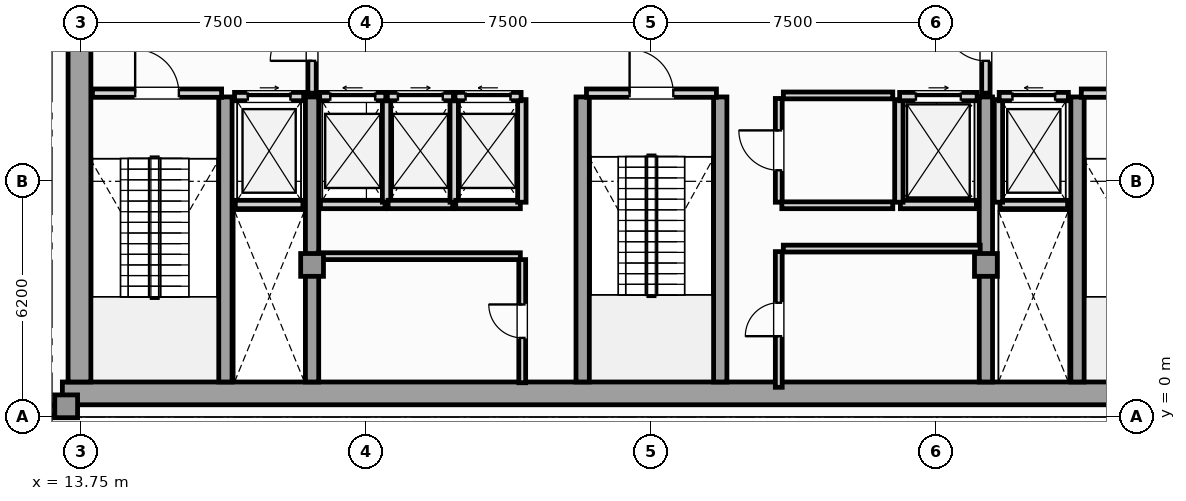
"""IFC4 building model, lengths in metres.
Left out: names, types, materials, properties, quantities, classifications, styles, units other than length and angle.
Written with IfcOpenShell. Run it as: python <this file> out.ifc"""

import sys

from ifc_helpers import new_model, si_unit, direction, frame, frame_2d, origin, origin_2d, place, context, subcontext, project, spatial, rectangle, extrude, element, fill, save


model = new_model("IFC4")
c1 = context("Model", 3, precision=1e-05, world=origin(), true_north=direction((0.0, 1.0)))
c2 = subcontext(c1, "Body", "Model", "MODEL_VIEW")
j1 = project(units=[si_unit("LENGTHUNIT", "METRE"), si_unit("PLANEANGLEUNIT", "RADIAN")], contexts=[c1])
p1 = place(None, origin())
s1 = spatial("IfcSite", under=j1, at=p1, CompositionType="ELEMENT")
p2 = place(p1, origin())
s2 = spatial("IfcBuilding", under=s1, at=p2, CompositionType="ELEMENT")
p3 = place(p2, frame((0.0, 0.0, 276.0)))
s3 = spatial("IfcBuildingStorey", under=s2, at=p3, CompositionType="ELEMENT", Elevation=276.0)
p4 = place(p3, frame((13.25, 0.62, 0.0), z_axis=(0.0, 0.0, 1.0), x_axis=(1.0, 0.0, 0.0)))
e1 = element("IfcWall", 1, at=p4, inside=s3, PredefinedType="SHEAR", context=c2, shape_type="SweptSolid", body=[
    extrude(rectangle(XDim=31.0, YDim=0.6, at=frame_2d((15.5, 0.0))), origin(), (0.0, 0.0, 1.0), 4.85),
])
p5 = place(p3, frame((13.7, 0.92, 0.0), z_axis=(0.0, 0.0, 1.0), x_axis=(0.0, 1.0, 0.0)))
e2 = element("IfcWall", 2, at=p5, inside=s3, PredefinedType="SHEAR", context=c2, shape_type="SweptSolid", body=[
    extrude(rectangle(XDim=10.53, YDim=0.6, at=frame_2d((5.265, 0.0))), origin(), (0.0, 0.0, 1.0), 4.85),
])
for number, where, z_axis, x_axis in (
    (3, (17.54, 0.92, 0.0), (0.0, 0.0, 1.0), (0.0, 1.0, 0.0)),
    (4, (19.82, 0.92, 0.0), (0.0, 0.0, 1.0), (0.0, 1.0, 0.0)),
    (5, (26.94, 0.92, 0.0), (0.0, 0.0, 1.0), (0.0, 1.0, 0.0)),
    (6, (30.56, 0.92, 0.0), (0.0, 0.0, 1.0), (0.0, 1.0, 0.0)),
    (7, (37.55, 0.92, 0.0), (0.0, 0.0, 1.0), (0.0, 1.0, 0.0)),
    (8, (39.96, 0.92, 0.0), (0.0, 0.0, 1.0), (0.0, 1.0, 0.0)),
):
    element("IfcWall", number, at=place(p3, frame(where, z_axis=z_axis, x_axis=x_axis)), inside=s3, PredefinedType="SHEAR", context=c2, shape_type="SweptSolid", body=[
        extrude(rectangle(XDim=7.5, YDim=0.35, at=frame_2d((3.75, 0.0))), origin(), (0.0, 0.0, 1.0), 4.85),
    ])
for number, where, z_axis, x_axis in (
    (9, (13.35, 0.28, 0.0), (0.0, 0.0, 1.0), (1.0, 0.0, 0.0)),
    (10, (19.82, 4.0, 0.0), (0.0, 0.0, 1.0), (1.0, 0.0, 0.0)),
    (11, (37.55, 4.0, 0.0), (0.0, 0.0, 1.0), (1.0, 0.0, 0.0)),
):
    element("IfcColumn", number, at=place(p3, frame(where, z_axis=z_axis, x_axis=x_axis)), inside=s3, PredefinedType="COLUMN", context=c2, shape_type="SweptSolid", body=[
        extrude(rectangle(XDim=0.6, YDim=0.6, at=origin_2d()), origin(), (0.0, 0.0, 1.0), 5.05),
    ])
p6 = place(p3, frame((11.522, 0.18, 0.0), z_axis=(0.0, 0.0, 1.0), x_axis=(1.0, 0.0, 0.0)))
e12 = element("IfcWall", 12, at=p6, inside=s3, PredefinedType="SOLIDWALL", context=c2, shape_type="SweptSolid", body=[
    extrude(rectangle(XDim=1.728, YDim=0.26, at=frame_2d((0.864, 0.0))), origin(), (0.0, 0.0, 1.0), 4.85),
])
p7 = place(p3, frame((17.8, 5.59, 0.0), z_axis=(0.0, 0.0, 1.0), x_axis=(1.0, 0.0, 0.0)))
e13 = element("IfcWall", 13, at=p7, inside=s3, PredefinedType="SOLIDWALL", context=c2, shape_type="SweptSolid", body=[
    extrude(rectangle(XDim=1.78, YDim=0.22, at=frame_2d((0.89, 0.0))), origin(), (0.0, 0.0, 1.0), 4.85),
])
p8 = place(p3, frame((17.78, 8.43, 0.0), z_axis=(0.0, 0.0, 1.0), x_axis=(1.0, 0.0, 0.0)))
e14 = element("IfcWall", 14, at=p8, inside=s3, PredefinedType="SOLIDWALL", context=c2, shape_type="SweptSolid", body=[
    extrude(rectangle(XDim=1.82, YDim=0.22, at=frame_2d((0.91, 0.0))), origin(), (0.0, 0.0, 1.0), 4.85),
])
p9 = place(p8, frame((0.35, 0.0, 0.0)))
e15 = element("IfcOpeningElement", 15, at=p9, cuts=e14, PredefinedType="OPENING", context=c2, shape_type="SweptSolid", body=[
    extrude(rectangle(XDim=1.12, YDim=2.25, at=frame_2d((0.56, 1.125))), frame((0.0, 0.12, 0.0), z_axis=(0.0, -1.0, 0.0), x_axis=(1.0, 0.0, 0.0)), (0.0, 0.0, 1.0), 0.24),
])
p10 = place(p3, frame((37.92, 5.59, 0.0), z_axis=(0.0, 0.0, 1.0), x_axis=(1.0, 0.0, 0.0)))
e16 = element("IfcWall", 16, at=p10, inside=s3, PredefinedType="SOLIDWALL", context=c2, shape_type="SweptSolid", body=[
    extrude(rectangle(XDim=1.78, YDim=0.22, at=frame_2d((0.89, 0.0))), origin(), (0.0, 0.0, 1.0), 4.85),
])
p11 = place(p3, frame((37.88, 5.65, 0.0), z_axis=(0.0, 0.0, 1.0), x_axis=(0.0, 1.0, 0.0)))
e17 = element("IfcWall", 17, at=p11, inside=s3, PredefinedType="SOLIDWALL", context=c2, shape_type="SweptSolid", body=[
    extrude(rectangle(XDim=2.7, YDim=0.22, at=frame_2d((1.35, 0.0))), origin(), (0.0, 0.0, 1.0), 4.85),
])
p12 = place(p3, frame((37.9, 8.43, 0.0), z_axis=(0.0, 0.0, 1.0), x_axis=(1.0, 0.0, 0.0)))
e18 = element("IfcWall", 18, at=p12, inside=s3, PredefinedType="SOLIDWALL", context=c2, shape_type="SweptSolid", body=[
    extrude(rectangle(XDim=1.82, YDim=0.22, at=frame_2d((0.91, 0.0))), origin(), (0.0, 0.0, 1.0), 4.85),
])
p13 = place(p12, frame((0.35, 0.0, 0.0)))
e19 = element("IfcOpeningElement", 19, at=p13, cuts=e18, PredefinedType="OPENING", context=c2, shape_type="SweptSolid", body=[
    extrude(rectangle(XDim=1.12, YDim=2.25, at=frame_2d((0.56, 1.125))), frame((0.0, 0.12, 0.0), z_axis=(0.0, -1.0, 0.0), x_axis=(1.0, 0.0, 0.0)), (0.0, 0.0, 1.0), 0.24),
])
p14 = place(p3, frame((35.3, 5.59, 0.0), z_axis=(0.0, 0.0, 1.0), x_axis=(1.0, 0.0, 0.0)))
e20 = element("IfcWall", 20, at=p14, inside=s3, PredefinedType="SOLIDWALL", context=c2, shape_type="SweptSolid", body=[
    extrude(rectangle(XDim=2.0, YDim=0.22, at=frame_2d((1.0, 0.0))), origin(), (0.0, 0.0, 1.0), 4.85),
])
p15 = place(p3, frame((35.26, 5.65, 0.0), z_axis=(0.0, 0.0, 1.0), x_axis=(0.0, 1.0, 0.0)))
e21 = element("IfcWall", 21, at=p15, inside=s3, PredefinedType="SOLIDWALL", context=c2, shape_type="SweptSolid", body=[
    extrude(rectangle(XDim=2.7, YDim=0.22, at=frame_2d((1.35, 0.0))), origin(), (0.0, 0.0, 1.0), 4.85),
])
p16 = place(p3, frame((35.28, 8.43, 0.0), z_axis=(0.0, 0.0, 1.0), x_axis=(1.0, 0.0, 0.0)))
e22 = element("IfcWall", 22, at=p16, inside=s3, PredefinedType="SOLIDWALL", context=c2, shape_type="SweptSolid", body=[
    extrude(rectangle(XDim=2.04, YDim=0.22, at=frame_2d((1.02, 0.0))), origin(), (0.0, 0.0, 1.0), 4.85),
])
p17 = place(p16, frame((0.43, 0.0, 0.0)))
e23 = element("IfcOpeningElement", 23, at=p17, cuts=e22, PredefinedType="OPENING", context=c2, shape_type="SweptSolid", body=[
    extrude(rectangle(XDim=1.18, YDim=2.2, at=frame_2d((0.59, 1.1))), frame((0.0, 0.12, 0.0), z_axis=(0.0, -1.0, 0.0), x_axis=(1.0, 0.0, 0.0)), (0.0, 0.0, 1.0), 0.24),
])
p18 = place(p3, frame((20.04, 5.59, 0.0), z_axis=(0.0, 0.0, 1.0), x_axis=(1.0, 0.0, 0.0)))
e24 = element("IfcWall", 24, at=p18, inside=s3, PredefinedType="SOLIDWALL", context=c2, shape_type="SweptSolid", body=[
    extrude(rectangle(XDim=1.7, YDim=0.22, at=frame_2d((0.85, 0.0))), origin(), (0.0, 0.0, 1.0), 4.85),
])
p19 = place(p3, frame((21.78, 5.65, 0.0), z_axis=(0.0, 0.0, 1.0), x_axis=(0.0, 1.0, 0.0)))
e25 = element("IfcWall", 25, at=p19, inside=s3, PredefinedType="SOLIDWALL", context=c2, shape_type="SweptSolid", body=[
    extrude(rectangle(XDim=2.7, YDim=0.22, at=frame_2d((1.35, 0.0))), origin(), (0.0, 0.0, 1.0), 4.85),
])
p20 = place(p3, frame((20.02, 8.43, 0.0), z_axis=(0.0, 0.0, 1.0), x_axis=(1.0, 0.0, 0.0)))
e26 = element("IfcWall", 26, at=p20, inside=s3, PredefinedType="SOLIDWALL", context=c2, shape_type="SweptSolid", body=[
    extrude(rectangle(XDim=1.74, YDim=0.22, at=frame_2d((0.87, 0.0))), origin(), (0.0, 0.0, 1.0), 4.85),
])
p21 = place(p20, frame((0.28, 0.0, 0.0)))
e27 = element("IfcOpeningElement", 27, at=p21, cuts=e26, PredefinedType="OPENING", context=c2, shape_type="SweptSolid", body=[
    extrude(rectangle(XDim=1.18, YDim=2.2, at=frame_2d((0.59, 1.1))), frame((0.0, 0.12, 0.0), z_axis=(0.0, -1.0, 0.0), x_axis=(1.0, 0.0, 0.0)), (0.0, 0.0, 1.0), 0.24),
])
p22 = place(p3, frame((21.82, 5.59, 0.0), z_axis=(0.0, 0.0, 1.0), x_axis=(1.0, 0.0, 0.0)))
e28 = element("IfcWall", 28, at=p22, inside=s3, PredefinedType="SOLIDWALL", context=c2, shape_type="SweptSolid", body=[
    extrude(rectangle(XDim=1.7, YDim=0.22, at=frame_2d((0.85, 0.0))), origin(), (0.0, 0.0, 1.0), 4.85),
])
p23 = place(p3, frame((23.56, 5.65, 0.0), z_axis=(0.0, 0.0, 1.0), x_axis=(0.0, 1.0, 0.0)))
e29 = element("IfcWall", 29, at=p23, inside=s3, PredefinedType="SOLIDWALL", context=c2, shape_type="SweptSolid", body=[
    extrude(rectangle(XDim=2.7, YDim=0.22, at=frame_2d((1.35, 0.0))), origin(), (0.0, 0.0, 1.0), 4.85),
])
p24 = place(p3, frame((21.8, 8.43, 0.0), z_axis=(0.0, 0.0, 1.0), x_axis=(1.0, 0.0, 0.0)))
e30 = element("IfcWall", 30, at=p24, inside=s3, PredefinedType="SOLIDWALL", context=c2, shape_type="SweptSolid", body=[
    extrude(rectangle(XDim=1.74, YDim=0.22, at=frame_2d((0.87, 0.0))), origin(), (0.0, 0.0, 1.0), 4.85),
])
p25 = place(p24, frame((0.28, 0.0, 0.0)))
e31 = element("IfcOpeningElement", 31, at=p25, cuts=e30, PredefinedType="OPENING", context=c2, shape_type="SweptSolid", body=[
    extrude(rectangle(XDim=1.18, YDim=2.2, at=frame_2d((0.59, 1.1))), frame((0.0, 0.12, 0.0), z_axis=(0.0, -1.0, 0.0), x_axis=(1.0, 0.0, 0.0)), (0.0, 0.0, 1.0), 0.24),
])
p26 = place(p3, frame((23.6, 5.59, 0.0), z_axis=(0.0, 0.0, 1.0), x_axis=(1.0, 0.0, 0.0)))
e32 = element("IfcWall", 32, at=p26, inside=s3, PredefinedType="SOLIDWALL", context=c2, shape_type="SweptSolid", body=[
    extrude(rectangle(XDim=1.7, YDim=0.22, at=frame_2d((0.85, 0.0))), origin(), (0.0, 0.0, 1.0), 4.85),
])
p27 = place(p3, frame((25.34, 5.65, 0.0), z_axis=(0.0, 0.0, 1.0), x_axis=(0.0, 1.0, 0.0)))
e33 = element("IfcWall", 33, at=p27, inside=s3, PredefinedType="SOLIDWALL", context=c2, shape_type="SweptSolid", body=[
    extrude(rectangle(XDim=2.7, YDim=0.22, at=frame_2d((1.35, 0.0))), origin(), (0.0, 0.0, 1.0), 4.85),
])
p28 = place(p3, frame((23.58, 8.43, 0.0), z_axis=(0.0, 0.0, 1.0), x_axis=(1.0, 0.0, 0.0)))
e34 = element("IfcWall", 34, at=p28, inside=s3, PredefinedType="SOLIDWALL", context=c2, shape_type="SweptSolid", body=[
    extrude(rectangle(XDim=1.74, YDim=0.22, at=frame_2d((0.87, 0.0))), origin(), (0.0, 0.0, 1.0), 4.85),
])
p29 = place(p28, frame((0.28, 0.0, 0.0)))
e35 = element("IfcOpeningElement", 35, at=p29, cuts=e34, PredefinedType="OPENING", context=c2, shape_type="SweptSolid", body=[
    extrude(rectangle(XDim=1.18, YDim=2.2, at=frame_2d((0.59, 1.1))), frame((0.0, 0.12, 0.0), z_axis=(0.0, -1.0, 0.0), x_axis=(1.0, 0.0, 0.0)), (0.0, 0.0, 1.0), 0.24),
])
p30 = place(p3, frame((14.04, 8.52, 0.0), z_axis=(0.0, 0.0, 1.0), x_axis=(1.0, 0.0, 0.0)))
e36 = element("IfcWall", 36, at=p30, inside=s3, PredefinedType="SOLIDWALL", context=c2, shape_type="SweptSolid", body=[
    extrude(rectangle(XDim=3.4, YDim=0.22, at=frame_2d((1.7, 0.0))), origin(), (0.0, 0.0, 1.0), 4.85),
])
p31 = place(p30, frame((1.125, 0.0, 0.0)))
e37 = element("IfcOpeningElement", 37, at=p31, cuts=e36, PredefinedType="OPENING", context=c2, shape_type="SweptSolid", body=[
    extrude(rectangle(XDim=1.15, YDim=2.2, at=frame_2d((0.575, 1.1))), frame((0.0, 0.12, 0.0), z_axis=(0.0, -1.0, 0.0), x_axis=(1.0, 0.0, 0.0)), (0.0, 0.0, 1.0), 0.24),
])
p32 = place(p3, frame((40.06, 8.52, 0.0), z_axis=(0.0, 0.0, 1.0), x_axis=(1.0, 0.0, 0.0)))
e38 = element("IfcWall", 38, at=p32, inside=s3, PredefinedType="SOLIDWALL", context=c2, shape_type="SweptSolid", body=[
    extrude(rectangle(XDim=3.4, YDim=0.22, at=frame_2d((1.7, 0.0))), origin(), (0.0, 0.0, 1.0), 4.85),
])
p33 = place(p32, frame((1.125, 0.0, 0.0)))
e39 = element("IfcOpeningElement", 39, at=p33, cuts=e38, PredefinedType="OPENING", context=c2, shape_type="SweptSolid", body=[
    extrude(rectangle(XDim=1.15, YDim=2.2, at=frame_2d((0.575, 1.1))), frame((0.0, 0.12, 0.0), z_axis=(0.0, -1.0, 0.0), x_axis=(1.0, 0.0, 0.0)), (0.0, 0.0, 1.0), 0.24),
])
p34 = place(p3, frame((27.04, 8.52, 0.0), z_axis=(0.0, 0.0, 1.0), x_axis=(1.0, 0.0, 0.0)))
e40 = element("IfcWall", 40, at=p34, inside=s3, PredefinedType="SOLIDWALL", context=c2, shape_type="SweptSolid", body=[
    extrude(rectangle(XDim=3.42, YDim=0.22, at=frame_2d((1.71, 0.0))), origin(), (0.0, 0.0, 1.0), 4.85),
])
p35 = place(p34, frame((1.135, 0.0, 0.0)))
e41 = element("IfcOpeningElement", 41, at=p35, cuts=e40, PredefinedType="OPENING", context=c2, shape_type="SweptSolid", body=[
    extrude(rectangle(XDim=1.15, YDim=2.2, at=frame_2d((0.575, 1.1))), frame((0.0, 0.12, 0.0), z_axis=(0.0, -1.0, 0.0), x_axis=(1.0, 0.0, 0.0)), (0.0, 0.0, 1.0), 0.24),
])
p36 = place(p3, frame((19.82, 8.52, 0.0), z_axis=(0.0, 0.0, 1.0), x_axis=(0.0, 1.0, 0.0)))
e42 = element("IfcWall", 42, at=p36, inside=s3, PredefinedType="SOLIDWALL", context=c2, shape_type="SweptSolid", body=[
    extrude(rectangle(XDim=2.8, YDim=0.22, at=frame_2d((1.4, 0.0))), origin(), (0.0, 0.0, 1.0), 4.305),
])
p37 = place(p36, frame((0.85, 0.0, 0.0)))
e43 = element("IfcOpeningElement", 43, at=p37, cuts=e42, PredefinedType="OPENING", context=c2, shape_type="SweptSolid", body=[
    extrude(rectangle(XDim=1.1, YDim=2.2, at=frame_2d((0.55, 1.1))), frame((0.0, 0.12, 0.0), z_axis=(0.0, -1.0, 0.0), x_axis=(1.0, 0.0, 0.0)), (0.0, 0.0, 1.0), 0.24),
])
p38 = place(p3, frame((37.55, 8.52, 0.0), z_axis=(0.0, 0.0, 1.0), x_axis=(0.0, 1.0, 0.0)))
e44 = element("IfcWall", 44, at=p38, inside=s3, PredefinedType="SOLIDWALL", context=c2, shape_type="SweptSolid", body=[
    extrude(rectangle(XDim=2.8, YDim=0.22, at=frame_2d((1.4, 0.0))), origin(), (0.0, 0.0, 1.0), 4.305),
])
p39 = place(p38, frame((0.85, 0.0, 0.0)))
e45 = element("IfcOpeningElement", 45, at=p39, cuts=e44, PredefinedType="OPENING", context=c2, shape_type="SweptSolid", body=[
    extrude(rectangle(XDim=1.1, YDim=2.2, at=frame_2d((0.55, 1.1))), frame((0.0, 0.12, 0.0), z_axis=(0.0, -1.0, 0.0), x_axis=(1.0, 0.0, 0.0)), (0.0, 0.0, 1.0), 0.24),
])
p40 = place(p3, frame((25.35, 0.9, 0.0), z_axis=(0.0, 0.0, 1.0), x_axis=(0.0, 1.0, 0.0)))
e46 = element("IfcWall", 46, at=p40, inside=s3, PredefinedType="PARTITIONING", context=c2, shape_type="SweptSolid", body=[
    extrude(rectangle(XDim=3.24, YDim=0.18, at=frame_2d((1.62, 0.0))), origin(), (0.0, 0.0, 1.0), 4.85),
])
p41 = place(p40, frame((1.18, 0.0, 0.0)))
e47 = element("IfcOpeningElement", 47, at=p41, cuts=e46, PredefinedType="OPENING", context=c2, shape_type="SweptSolid", body=[
    extrude(rectangle(XDim=0.88, YDim=2.05, at=frame_2d((0.44, 1.025))), frame((0.0, 0.1, 0.0), z_axis=(0.0, -1.0, 0.0), x_axis=(1.0, 0.0, 0.0)), (0.0, 0.0, 1.0), 0.2),
])
p42 = place(p3, frame((19.98, 4.23, 0.0), z_axis=(0.0, 0.0, 1.0), x_axis=(1.0, 0.0, 0.0)))
e48 = element("IfcWall", 48, at=p42, inside=s3, PredefinedType="PARTITIONING", context=c2, shape_type="SweptSolid", body=[
    extrude(rectangle(XDim=5.32, YDim=0.18, at=frame_2d((2.66, 0.0))), origin(), (0.0, 0.0, 1.0), 4.85),
])
p43 = place(p3, frame((32.1, 0.78, 0.0), z_axis=(0.0, 0.0, 1.0), x_axis=(0.0, 1.0, 0.0)))
e49 = element("IfcWall", 49, at=p43, inside=s3, PredefinedType="PARTITIONING", context=c2, shape_type="SweptSolid", body=[
    extrude(rectangle(XDim=3.57, YDim=0.18, at=frame_2d((1.785, 0.0))), origin(), (0.0, 0.0, 1.0), 4.85),
])
p44 = place(p43, frame((1.345, 0.0, 0.0)))
e50 = element("IfcOpeningElement", 50, at=p44, cuts=e49, PredefinedType="OPENING", context=c2, shape_type="SweptSolid", body=[
    extrude(rectangle(XDim=0.88, YDim=2.05, at=frame_2d((0.44, 1.025))), frame((0.0, 0.1, 0.0), z_axis=(0.0, -1.0, 0.0), x_axis=(1.0, 0.0, 0.0)), (0.0, 0.0, 1.0), 0.2),
])
p45 = place(p3, frame((32.22, 4.43, 0.0), z_axis=(0.0, 0.0, 1.0), x_axis=(1.0, 0.0, 0.0)))
e51 = element("IfcWall", 51, at=p45, inside=s3, PredefinedType="PARTITIONING", context=c2, shape_type="SweptSolid", body=[
    extrude(rectangle(XDim=5.18, YDim=0.18, at=frame_2d((2.59, 0.0))), origin(), (0.0, 0.0, 1.0), 4.85),
])
p46 = place(p3, frame((32.1, 5.65, 0.0), z_axis=(0.0, 0.0, 1.0), x_axis=(0.0, 1.0, 0.0)))
e52 = element("IfcWall", 52, at=p46, inside=s3, PredefinedType="PARTITIONING", context=c2, shape_type="SweptSolid", body=[
    extrude(rectangle(XDim=2.73, YDim=0.18, at=frame_2d((1.365, 0.0))), origin(), (0.0, 0.0, 1.0), 4.85),
])
p47 = place(p46, frame((0.84, 0.0, 0.0)))
e53 = element("IfcOpeningElement", 53, at=p47, cuts=e52, PredefinedType="OPENING", context=c2, shape_type="SweptSolid", body=[
    extrude(rectangle(XDim=1.05, YDim=2.15, at=frame_2d((0.525, 1.075))), frame((0.0, 0.1, 0.0), z_axis=(0.0, -1.0, 0.0), x_axis=(1.0, 0.0, 0.0)), (0.0, 0.0, 1.0), 0.2),
])
p48 = place(p3, frame((32.22, 8.46, 0.0), z_axis=(0.0, 0.0, 1.0), x_axis=(1.0, 0.0, 0.0)))
e54 = element("IfcWall", 54, at=p48, inside=s3, PredefinedType="PARTITIONING", context=c2, shape_type="SweptSolid", body=[
    extrude(rectangle(XDim=2.88, YDim=0.18, at=frame_2d((1.44, 0.0))), origin(), (0.0, 0.0, 1.0), 4.85),
])
p49 = place(p3, frame((32.18, 5.57, 0.0), z_axis=(0.0, 0.0, 1.0), x_axis=(1.0, 0.0, 0.0)))
e55 = element("IfcWall", 55, at=p49, inside=s3, PredefinedType="PARTITIONING", context=c2, shape_type="SweptSolid", body=[
    extrude(rectangle(XDim=2.92, YDim=0.18, at=frame_2d((1.46, 0.0))), origin(), (0.0, 0.0, 1.0), 4.85),
])
p50 = place(p9, origin())
e56 = element("IfcDoor", 56, at=p50, inside=s3, OperationType="SLIDING_TO_RIGHT", PredefinedType="DOOR", context=c2, shape_type="SweptSolid", body=[
    extrude(rectangle(XDim=1.12, YDim=2.25, at=frame_2d((0.56, 1.125))), frame((0.0, 0.025, 0.0), z_axis=(0.0, -1.0, 0.0), x_axis=(1.0, 0.0, 0.0)), (0.0, 0.0, 1.0), 0.05),
])
fill(e15, e56)
p51 = place(p13, origin())
e57 = element("IfcDoor", 57, at=p51, inside=s3, OperationType="SLIDING_TO_LEFT", PredefinedType="DOOR", context=c2, shape_type="SweptSolid", body=[
    extrude(rectangle(XDim=1.12, YDim=2.25, at=frame_2d((0.56, 1.125))), frame((0.0, 0.025, 0.0), z_axis=(0.0, -1.0, 0.0), x_axis=(1.0, 0.0, 0.0)), (0.0, 0.0, 1.0), 0.05),
])
fill(e19, e57)
p52 = place(p17, origin())
e58 = element("IfcDoor", 58, at=p52, inside=s3, OperationType="SLIDING_TO_RIGHT", PredefinedType="DOOR", context=c2, shape_type="SweptSolid", body=[
    extrude(rectangle(XDim=1.18, YDim=2.2, at=frame_2d((0.59, 1.1))), frame((0.0, 0.025, 0.0), z_axis=(0.0, -1.0, 0.0), x_axis=(1.0, 0.0, 0.0)), (0.0, 0.0, 1.0), 0.05),
])
fill(e23, e58)
p53 = place(p21, origin())
e59 = element("IfcDoor", 59, at=p53, inside=s3, OperationType="SLIDING_TO_LEFT", PredefinedType="DOOR", context=c2, shape_type="SweptSolid", body=[
    extrude(rectangle(XDim=1.18, YDim=2.2, at=frame_2d((0.59, 1.1))), frame((0.0, 0.025, 0.0), z_axis=(0.0, -1.0, 0.0), x_axis=(1.0, 0.0, 0.0)), (0.0, 0.0, 1.0), 0.05),
])
fill(e27, e59)
p54 = place(p25, origin())
e60 = element("IfcDoor", 60, at=p54, inside=s3, OperationType="SLIDING_TO_RIGHT", PredefinedType="DOOR", context=c2, shape_type="SweptSolid", body=[
    extrude(rectangle(XDim=1.18, YDim=2.2, at=frame_2d((0.59, 1.1))), frame((0.0, 0.025, 0.0), z_axis=(0.0, -1.0, 0.0), x_axis=(1.0, 0.0, 0.0)), (0.0, 0.0, 1.0), 0.05),
])
fill(e31, e60)
p55 = place(p29, origin())
e61 = element("IfcDoor", 61, at=p55, inside=s3, OperationType="SLIDING_TO_LEFT", PredefinedType="DOOR", context=c2, shape_type="SweptSolid", body=[
    extrude(rectangle(XDim=1.18, YDim=2.2, at=frame_2d((0.59, 1.1))), frame((0.0, 0.025, 0.0), z_axis=(0.0, -1.0, 0.0), x_axis=(1.0, 0.0, 0.0)), (0.0, 0.0, 1.0), 0.05),
])
fill(e35, e61)
p56 = place(p31, origin())
e62 = element("IfcDoor", 62, at=p56, inside=s3, OperationType="SINGLE_SWING_LEFT", PredefinedType="DOOR", context=c2, shape_type="SweptSolid", body=[
    extrude(rectangle(XDim=1.15, YDim=2.2, at=frame_2d((0.575, 1.1))), frame((0.0, 0.025, 0.0), z_axis=(0.0, -1.0, 0.0), x_axis=(1.0, 0.0, 0.0)), (0.0, 0.0, 1.0), 0.05),
])
fill(e37, e62)
p57 = place(p35, origin())
e63 = element("IfcDoor", 63, at=p57, inside=s3, OperationType="SINGLE_SWING_LEFT", PredefinedType="DOOR", context=c2, shape_type="SweptSolid", body=[
    extrude(rectangle(XDim=1.15, YDim=2.2, at=frame_2d((0.575, 1.1))), frame((0.0, 0.025, 0.0), z_axis=(0.0, -1.0, 0.0), x_axis=(1.0, 0.0, 0.0)), (0.0, 0.0, 1.0), 0.05),
])
fill(e41, e63)
p58 = place(p37, origin())
e64 = element("IfcDoor", 64, at=p58, inside=s3, OperationType="SINGLE_SWING_LEFT", PredefinedType="DOOR", context=c2, shape_type="SweptSolid", body=[
    extrude(rectangle(XDim=1.1, YDim=2.2, at=frame_2d((0.55, 1.1))), frame((0.0, 0.025, 0.0), z_axis=(0.0, -1.0, 0.0), x_axis=(1.0, 0.0, 0.0)), (0.0, 0.0, 1.0), 0.05),
])
fill(e43, e64)
p59 = place(p39, origin())
e65 = element("IfcDoor", 65, at=p59, inside=s3, OperationType="SINGLE_SWING_RIGHT", PredefinedType="DOOR", context=c2, shape_type="SweptSolid", body=[
    extrude(rectangle(XDim=1.1, YDim=2.2, at=frame_2d((0.55, 1.1))), frame((0.0, 0.025, 0.0), z_axis=(0.0, -1.0, 0.0), x_axis=(1.0, 0.0, 0.0)), (0.0, 0.0, 1.0), 0.05),
])
fill(e45, e65)
p60 = place(p41, origin())
e66 = element("IfcDoor", 66, at=p60, inside=s3, OperationType="SINGLE_SWING_RIGHT", PredefinedType="DOOR", context=c2, shape_type="SweptSolid", body=[
    extrude(rectangle(XDim=0.88, YDim=2.05, at=frame_2d((0.44, 1.025))), frame((0.0, 0.025, 0.0), z_axis=(0.0, -1.0, 0.0), x_axis=(1.0, 0.0, 0.0)), (0.0, 0.0, 1.0), 0.05),
])
fill(e47, e66)
p61 = place(p44, origin())
e67 = element("IfcDoor", 67, at=p61, inside=s3, OperationType="SINGLE_SWING_LEFT", PredefinedType="DOOR", context=c2, shape_type="SweptSolid", body=[
    extrude(rectangle(XDim=0.88, YDim=2.05, at=frame_2d((0.44, 1.025))), frame((0.0, 0.025, 0.0), z_axis=(0.0, -1.0, 0.0), x_axis=(1.0, 0.0, 0.0)), (0.0, 0.0, 1.0), 0.05),
])
fill(e50, e67)
p62 = place(p47, origin())
e68 = element("IfcDoor", 68, at=p62, inside=s3, OperationType="SINGLE_SWING_RIGHT", PredefinedType="DOOR", context=c2, shape_type="SweptSolid", body=[
    extrude(rectangle(XDim=1.05, YDim=2.15, at=frame_2d((0.525, 1.075))), frame((0.0, 0.025, 0.0), z_axis=(0.0, -1.0, 0.0), x_axis=(1.0, 0.0, 0.0)), (0.0, 0.0, 1.0), 0.05),
])
fill(e53, e68)
save(model, sys.argv[1])
